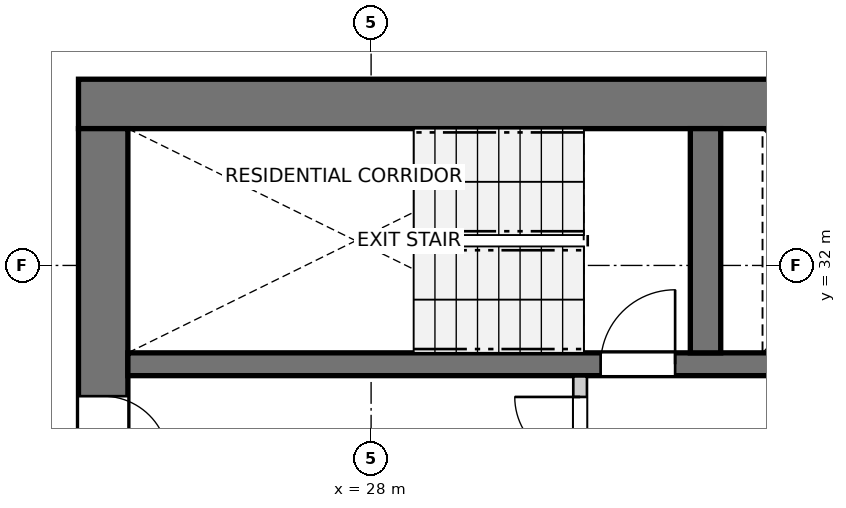
"""IFC4 building model, lengths in metres.
Left out: names, types, materials, properties, quantities, classifications, styles, units other than length and angle.
Written with IfcOpenShell. Run it as: python <this file> out.ifc"""

import sys

from ifc_helpers import new_model, si_unit, direction, frame, frame_2d, origin, place, context, subcontext, project, spatial, rectangle, extrude, source, transform, mapped, element, fill, save


model = new_model("IFC4")
c1 = context("Model", 3, precision=1e-05, world=origin(), true_north=direction((0.0, 1.0)))
c2 = subcontext(c1, "Body", "Model", "MODEL_VIEW")
j1 = project(units=[si_unit("LENGTHUNIT", "METRE"), si_unit("PLANEANGLEUNIT", "RADIAN")], contexts=[c1])
p1 = place(None, origin())
s1 = spatial("IfcSite", under=j1, at=p1, CompositionType="ELEMENT")
p2 = place(p1, origin())
s2 = spatial("IfcBuilding", under=s1, at=p2, CompositionType="ELEMENT")
p3 = place(p2, frame((0.0, 0.0, 70.4)))
s3 = spatial("IfcBuildingStorey", under=s2, at=p3, CompositionType="ELEMENT", Elevation=70.4)
p4 = place(p3, frame((36.55, 34.125, 0.0), z_axis=(0.0, 0.0, 1.0), x_axis=(-1.0, 0.0, 0.0)))
e1 = element("IfcWall", 1, at=p4, inside=s3, PredefinedType="SHEAR", context=c2, shape_type="SweptSolid", body=[
    extrude(rectangle(XDim=12.4, YDim=0.65, at=frame_2d((6.2, 0.0))), origin(), (0.0, 0.0, 1.0), 2.95),
])
p5 = place(p3, frame((24.475, 33.8, 0.0), z_axis=(0.0, 0.0, 1.0), x_axis=(0.0, -1.0, 0.0)))
e2 = element("IfcWall", 2, at=p5, inside=s3, PredefinedType="SHEAR", context=c2, shape_type="SweptSolid", body=[
    extrude(rectangle(XDim=15.6, YDim=0.65, at=frame_2d((7.8, 0.0))), origin(), (0.0, 0.0, 1.0), 2.95),
])
p6 = place(p5, frame((7.05, 0.0, 0.0)))
e3 = element("IfcOpeningElement", 3, at=p6, cuts=e2, PredefinedType="OPENING", context=c2, shape_type="SweptSolid", body=[
    extrude(rectangle(XDim=1.5, YDim=2.15, at=frame_2d((0.75, 1.075))), frame((0.0, 0.335, 0.0), z_axis=(0.0, -1.0, 0.0), x_axis=(1.0, 0.0, 0.0)), (0.0, 0.0, 1.0), 0.67),
])
p7 = place(p5, frame((3.52, 0.0, 0.0)))
e4 = element("IfcOpeningElement", 4, at=p7, cuts=e2, PredefinedType="OPENING", context=c2, shape_type="SweptSolid", body=[
    extrude(rectangle(XDim=0.86, YDim=2.05, at=frame_2d((0.43, 1.025))), frame((0.0, 0.335, 0.0), z_axis=(0.0, -1.0, 0.0), x_axis=(1.0, 0.0, 0.0)), (0.0, 0.0, 1.0), 0.67),
])
p8 = place(p5, frame((11.22, 0.0, 0.0)))
e5 = element("IfcOpeningElement", 5, at=p8, cuts=e2, PredefinedType="OPENING", context=c2, shape_type="SweptSolid", body=[
    extrude(rectangle(XDim=0.86, YDim=2.05, at=frame_2d((0.43, 1.025))), frame((0.0, 0.335, 0.0), z_axis=(0.0, -1.0, 0.0), x_axis=(1.0, 0.0, 0.0)), (0.0, 0.0, 1.0), 0.67),
])
p9 = place(p3, frame((24.8, 30.7, 0.0), z_axis=(0.0, 0.0, 1.0), x_axis=(1.0, 0.0, 0.0)))
e6 = element("IfcWall", 6, at=p9, inside=s3, PredefinedType="SHEAR", context=c2, shape_type="SweptSolid", body=[
    extrude(rectangle(XDim=11.1, YDim=0.3, at=frame_2d((5.55, 0.0))), origin(), (0.0, 0.0, 1.0), 2.95),
])
p10 = place(p9, frame((6.22, 0.0, 0.0)))
e7 = element("IfcOpeningElement", 7, at=p10, cuts=e6, PredefinedType="OPENING", context=c2, shape_type="SweptSolid", body=[
    extrude(rectangle(XDim=0.98, YDim=2.15, at=frame_2d((0.49, 1.075))), frame((0.0, 0.16, 0.0), z_axis=(0.0, -1.0, 0.0), x_axis=(1.0, 0.0, 0.0)), (0.0, 0.0, 1.0), 0.32),
])
p11 = place(p9, frame((9.15, 0.0, 0.0)))
e8 = element("IfcOpeningElement", 8, at=p11, cuts=e6, PredefinedType="OPENING", context=c2, shape_type="SweptSolid", body=[
    extrude(rectangle(XDim=1.15, YDim=2.15, at=frame_2d((0.575, 1.075))), frame((0.0, 0.16, 0.0), z_axis=(0.0, -1.0, 0.0), x_axis=(1.0, 0.0, 0.0)), (0.0, 0.0, 1.0), 0.32),
])
p12 = place(p3, frame((32.4, 30.85, 0.0), z_axis=(0.0, 0.0, 1.0), x_axis=(0.0, 1.0, 0.0)))
e9 = element("IfcWall", 9, at=p12, inside=s3, PredefinedType="SHEAR", context=c2, shape_type="SweptSolid", body=[
    extrude(rectangle(XDim=2.95, YDim=0.4, at=frame_2d((1.475, 0.0))), origin(), (0.0, 0.0, 1.0), 2.95),
])
p13 = place(p3, frame((30.75, 27.43, 0.0), z_axis=(0.0, 0.0, 1.0), x_axis=(0.0, 1.0, 0.0)))
e10 = element("IfcWall", 10, at=p13, inside=s3, PredefinedType="PARTITIONING", context=c2, shape_type="SweptSolid", body=[
    extrude(rectangle(XDim=3.11, YDim=0.18, at=frame_2d((1.555, 0.0))), origin(), (0.0, 0.0, 1.0), 2.95),
])
p14 = place(p13, frame((1.98, 0.0, 0.0)))
e11 = element("IfcOpeningElement", 11, at=p14, cuts=e10, PredefinedType="OPENING", context=c2, shape_type="SweptSolid", body=[
    extrude(rectangle(XDim=0.86, YDim=2.05, at=frame_2d((0.43, 1.025))), frame((0.0, 0.1, 0.0), z_axis=(0.0, -1.0, 0.0), x_axis=(1.0, 0.0, 0.0)), (0.0, 0.0, 1.0), 0.2),
])
m1 = source(origin(), c2, "Body", "SweptSolid", [
    extrude(rectangle(XDim=0.98, YDim=2.15, at=frame_2d((0.49, 1.075))), frame((0.0, 0.025, 0.0), z_axis=(0.0, -1.0, 0.0), x_axis=(1.0, 0.0, 0.0)), (0.0, 0.0, 1.0), 0.05),
])
p15 = place(p10, origin())
e12 = element("IfcDoor", 12, at=p15, inside=s3, OperationType="SINGLE_SWING_RIGHT", PredefinedType="DOOR", context=c2, shape_type="MappedRepresentation", body=[
    mapped(m1, transform((0.0, 0.0, 0.0), x_axis=(1.0, 0.0, 0.0), y_axis=(0.0, 1.0, 0.0), z_axis=(0.0, 0.0, 1.0), scale=1.0)),
])
fill(e7, e12)
m2 = source(origin(), c2, "Body", "SweptSolid", [
    extrude(rectangle(XDim=0.86, YDim=2.05, at=frame_2d((0.43, 1.025))), frame((0.0, 0.025, 0.0), z_axis=(0.0, -1.0, 0.0), x_axis=(1.0, 0.0, 0.0)), (0.0, 0.0, 1.0), 0.05),
])
p16 = place(p7, origin())
e13 = element("IfcDoor", 13, at=p16, inside=s3, OperationType="SINGLE_SWING_RIGHT", PredefinedType="DOOR", context=c2, shape_type="MappedRepresentation", body=[
    mapped(m2, transform((0.0, 0.0, 0.0), x_axis=(1.0, 0.0, 0.0), y_axis=(0.0, 1.0, 0.0), z_axis=(0.0, 0.0, 1.0), scale=1.0)),
])
fill(e4, e13)
p17 = place(p14, origin())
e14 = element("IfcDoor", 14, at=p17, inside=s3, OperationType="SINGLE_SWING_RIGHT", PredefinedType="DOOR", context=c2, shape_type="MappedRepresentation", body=[
    mapped(m2, transform((0.0, 0.0, 0.0), x_axis=(1.0, 0.0, 0.0), y_axis=(0.0, 1.0, 0.0), z_axis=(0.0, 0.0, 1.0), scale=1.0)),
])
fill(e11, e14)
save(model, sys.argv[1])
